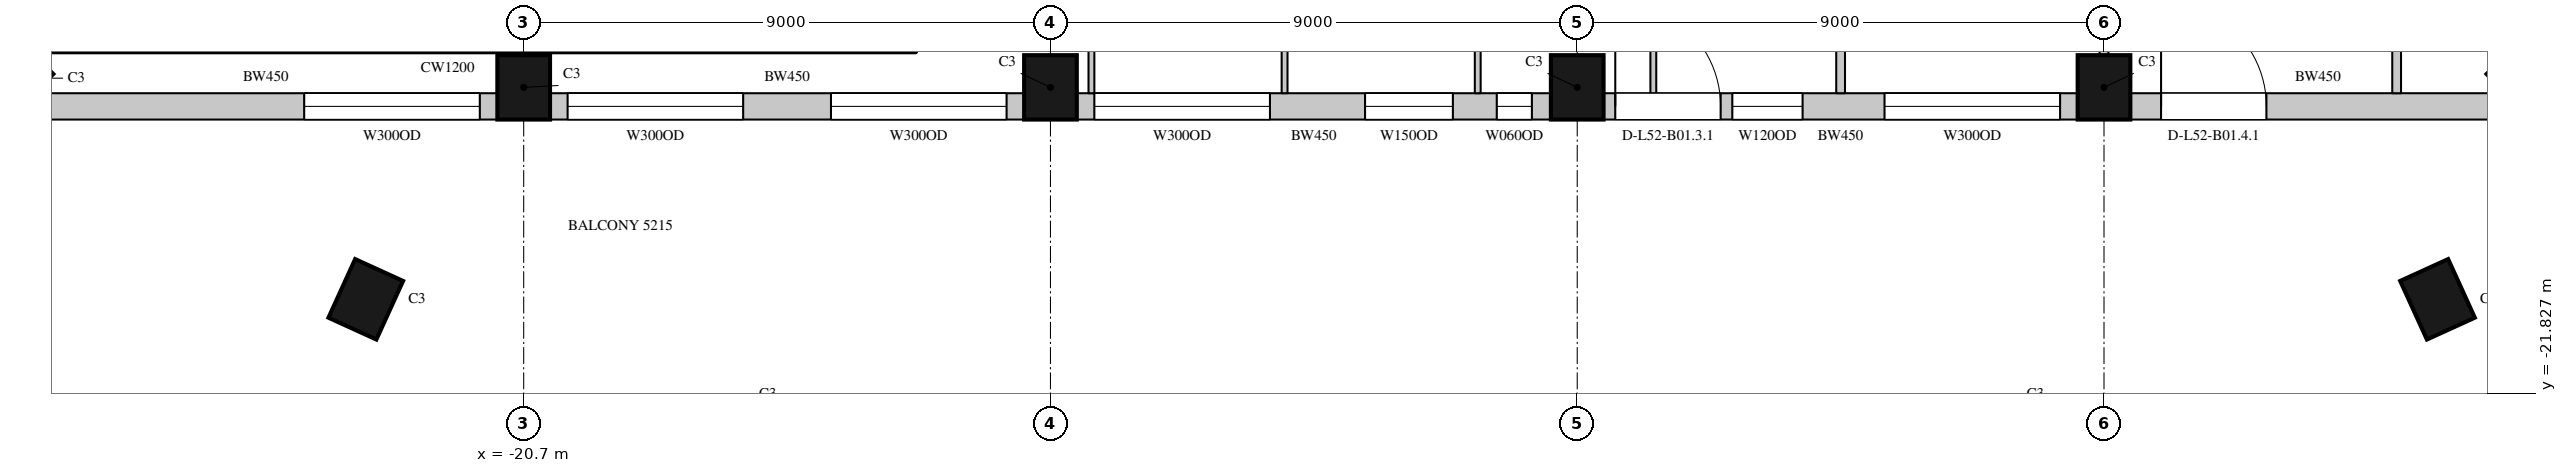
"""IFC4 building model, lengths in metres.
Left out: names, types, materials, properties, quantities, classifications, styles, units other than length and angle.
Written with IfcOpenShell. Run it as: python <this file> out.ifc"""

import sys

from ifc_helpers import new_model, si_unit, direction, frame, frame_2d, origin, origin_2d, place, context, subcontext, project, spatial, rectangle, extrude, element, fill, save


model = new_model("IFC4")
c1 = context("Model", 3, precision=1e-05, world=origin(), true_north=direction((0.0, 1.0)))
c2 = subcontext(c1, "Body", "Model", "MODEL_VIEW")
j1 = project(units=[si_unit("LENGTHUNIT", "METRE"), si_unit("PLANEANGLEUNIT", "RADIAN")], contexts=[c1])
p1 = place(None, origin())
s1 = spatial("IfcSite", under=j1, at=p1, CompositionType="ELEMENT")
p2 = place(p1, origin())
s2 = spatial("IfcBuilding", under=s1, at=p2, CompositionType="ELEMENT")
p3 = place(p2, frame((0.0, 0.0, 234.3)))
s3 = spatial("IfcBuildingStorey", under=s2, at=p3, CompositionType="ELEMENT", Elevation=234.3)
for number, where, z_axis, x_axis in (
    (1, (-29.443, -16.443, 0.0), (0.0, 0.0, 1.0), (0.707, -0.707, 0.0)),
    (2, (-20.7, -16.6, 0.0), (0.0, 0.0, 1.0), (1.0, 0.0, 0.0)),
    (3, (-11.7, -16.6, 0.0), (0.0, 0.0, 1.0), (1.0, 0.0, 0.0)),
    (4, (-2.7, -16.6, 0.0), (0.0, 0.0, 1.0), (1.0, 0.0, 0.0)),
    (5, (6.3, -16.6, 0.0), (0.0, 0.0, 1.0), (1.0, 0.0, 0.0)),
    (6, (13.543, -16.443, 0.0), (0.0, 0.0, 1.0), (0.707, 0.707, 0.0)),
    (7, (-23.398, -20.221, 0.0), (0.0, 0.0, 1.0), (0.91, -0.415, 0.0)),
    (8, (11.998, -20.221, 0.0), (0.0, 0.0, 1.0), (0.91, 0.415, 0.0)),
):
    element("IfcColumn", number, at=place(p3, frame(where, z_axis=z_axis, x_axis=x_axis)), inside=s3, PredefinedType="COLUMN", context=c2, shape_type="SweptSolid", body=[
        extrude(rectangle(XDim=0.9, YDim=1.1, at=origin_2d()), origin(), (0.0, 0.0, 1.0), 4.1),
    ])
p4 = place(p3, frame((-29.064, -16.925, 0.0), z_axis=(0.0, 0.0, 1.0), x_axis=(1.0, 0.0, 0.0)))
e9 = element("IfcWall", 9, at=p4, inside=s3, PredefinedType="SOLIDWALL", context=c2, shape_type="SweptSolid", body=[
    extrude(rectangle(XDim=7.914, YDim=0.45, at=frame_2d((3.957, 0.0))), origin(), (0.0, 0.0, 1.0), 3.8),
])
p5 = place(p4, frame((4.614, 0.0, 1.05)))
e10 = element("IfcOpeningElement", 10, at=p5, cuts=e9, PredefinedType="OPENING", context=c2, shape_type="SweptSolid", body=[
    extrude(rectangle(XDim=3.0, YDim=2.4, at=frame_2d((1.5, 1.2))), frame((0.0, 0.235, 0.0), z_axis=(0.0, -1.0, 0.0), x_axis=(1.0, 0.0, 0.0)), (0.0, 0.0, 1.0), 0.47),
])
p6 = place(p3, frame((-20.25, -16.925, 0.0), z_axis=(0.0, 0.0, 1.0), x_axis=(1.0, 0.0, 0.0)))
e11 = element("IfcWall", 11, at=p6, inside=s3, PredefinedType="SOLIDWALL", context=c2, shape_type="SweptSolid", body=[
    extrude(rectangle(XDim=8.1, YDim=0.45, at=frame_2d((4.05, 0.0))), origin(), (0.0, 0.0, 1.0), 3.8),
])
p7 = place(p6, frame((0.3, 0.0, 1.05)))
e12 = element("IfcOpeningElement", 12, at=p7, cuts=e11, PredefinedType="OPENING", context=c2, shape_type="SweptSolid", body=[
    extrude(rectangle(XDim=3.0, YDim=2.4, at=frame_2d((1.5, 1.2))), frame((0.0, 0.235, 0.0), z_axis=(0.0, -1.0, 0.0), x_axis=(1.0, 0.0, 0.0)), (0.0, 0.0, 1.0), 0.47),
])
p8 = place(p6, frame((4.8, 0.0, 1.05)))
e13 = element("IfcOpeningElement", 13, at=p8, cuts=e11, PredefinedType="OPENING", context=c2, shape_type="SweptSolid", body=[
    extrude(rectangle(XDim=3.0, YDim=2.4, at=frame_2d((1.5, 1.2))), frame((0.0, 0.235, 0.0), z_axis=(0.0, -1.0, 0.0), x_axis=(1.0, 0.0, 0.0)), (0.0, 0.0, 1.0), 0.47),
])
p9 = place(p3, frame((-11.25, -16.925, 0.0), z_axis=(0.0, 0.0, 1.0), x_axis=(1.0, 0.0, 0.0)))
e14 = element("IfcWall", 14, at=p9, inside=s3, PredefinedType="SOLIDWALL", context=c2, shape_type="SweptSolid", body=[
    extrude(rectangle(XDim=8.1, YDim=0.45, at=frame_2d((4.05, 0.0))), origin(), (0.0, 0.0, 1.0), 3.8),
])
p10 = place(p9, frame((0.3, 0.0, 1.05)))
e15 = element("IfcOpeningElement", 15, at=p10, cuts=e14, PredefinedType="OPENING", context=c2, shape_type="SweptSolid", body=[
    extrude(rectangle(XDim=3.0, YDim=2.4, at=frame_2d((1.5, 1.2))), frame((0.0, 0.235, 0.0), z_axis=(0.0, -1.0, 0.0), x_axis=(1.0, 0.0, 0.0)), (0.0, 0.0, 1.0), 0.47),
])
p11 = place(p9, frame((4.925, 0.0, 1.05)))
e16 = element("IfcOpeningElement", 16, at=p11, cuts=e14, PredefinedType="OPENING", context=c2, shape_type="SweptSolid", body=[
    extrude(rectangle(XDim=1.5, YDim=2.4, at=frame_2d((0.75, 1.2))), frame((0.0, 0.235, 0.0), z_axis=(0.0, -1.0, 0.0), x_axis=(1.0, 0.0, 0.0)), (0.0, 0.0, 1.0), 0.47),
])
p12 = place(p9, frame((7.175, 0.0, 1.05)))
e17 = element("IfcOpeningElement", 17, at=p12, cuts=e14, PredefinedType="OPENING", context=c2, shape_type="SweptSolid", body=[
    extrude(rectangle(XDim=0.6, YDim=2.4, at=frame_2d((0.3, 1.2))), frame((0.0, 0.235, 0.0), z_axis=(0.0, -1.0, 0.0), x_axis=(1.0, 0.0, 0.0)), (0.0, 0.0, 1.0), 0.47),
])
p13 = place(p3, frame((-2.25, -16.925, 0.0), z_axis=(0.0, 0.0, 1.0), x_axis=(1.0, 0.0, 0.0)))
e18 = element("IfcWall", 18, at=p13, inside=s3, PredefinedType="SOLIDWALL", context=c2, shape_type="SweptSolid", body=[
    extrude(rectangle(XDim=8.1, YDim=0.45, at=frame_2d((4.05, 0.0))), origin(), (0.0, 0.0, 1.0), 3.8),
])
p14 = place(p13, frame((0.2, 0.0, 0.0)))
e19 = element("IfcOpeningElement", 19, at=p14, cuts=e18, PredefinedType="OPENING", context=c2, shape_type="SweptSolid", body=[
    extrude(rectangle(XDim=1.8, YDim=2.4, at=frame_2d((0.9, 1.2))), frame((0.0, 0.235, 0.0), z_axis=(0.0, -1.0, 0.0), x_axis=(1.0, 0.0, 0.0)), (0.0, 0.0, 1.0), 0.47),
])
p15 = place(p13, frame((2.2, 0.0, 1.05)))
e20 = element("IfcOpeningElement", 20, at=p15, cuts=e18, PredefinedType="OPENING", context=c2, shape_type="SweptSolid", body=[
    extrude(rectangle(XDim=1.2, YDim=2.4, at=frame_2d((0.6, 1.2))), frame((0.0, 0.235, 0.0), z_axis=(0.0, -1.0, 0.0), x_axis=(1.0, 0.0, 0.0)), (0.0, 0.0, 1.0), 0.47),
])
p16 = place(p13, frame((4.8, 0.0, 1.05)))
e21 = element("IfcOpeningElement", 21, at=p16, cuts=e18, PredefinedType="OPENING", context=c2, shape_type="SweptSolid", body=[
    extrude(rectangle(XDim=3.0, YDim=2.4, at=frame_2d((1.5, 1.2))), frame((0.0, 0.235, 0.0), z_axis=(0.0, -1.0, 0.0), x_axis=(1.0, 0.0, 0.0)), (0.0, 0.0, 1.0), 0.47),
])
p17 = place(p3, frame((6.75, -16.925, 0.0), z_axis=(0.0, 0.0, 1.0), x_axis=(1.0, 0.0, 0.0)))
e22 = element("IfcWall", 22, at=p17, inside=s3, PredefinedType="SOLIDWALL", context=c2, shape_type="SweptSolid", body=[
    extrude(rectangle(XDim=6.414, YDim=0.45, at=frame_2d((3.207, 0.0))), origin(), (0.0, 0.0, 1.0), 3.8),
])
p18 = place(p17, frame((0.525, 0.0, 0.0)))
e23 = element("IfcOpeningElement", 23, at=p18, cuts=e22, PredefinedType="OPENING", context=c2, shape_type="SweptSolid", body=[
    extrude(rectangle(XDim=1.8, YDim=2.4, at=frame_2d((0.9, 1.2))), frame((0.0, 0.235, 0.0), z_axis=(0.0, -1.0, 0.0), x_axis=(1.0, 0.0, 0.0)), (0.0, 0.0, 1.0), 0.47),
])
p19 = place(p3, frame((-26.95, -18.0, 0.0), z_axis=(0.0, 0.0, 1.0), x_axis=(1.0, 0.0, 0.0)))
e24 = element("IfcWall", 24, at=p19, inside=s3, PredefinedType="SOLIDWALL", context=c2, shape_type="SweptSolid", body=[
    extrude(rectangle(XDim=2.36, YDim=0.45, at=frame_2d((1.18, 0.0))), origin(), (0.0, 0.0, 1.0), 0.6),
])
for number, where, z_axis, x_axis in (
    (25, (-23.69, -18.0, 0.0), (0.0, 0.0, 1.0), (1.0, 0.0, 0.0)),
    (26, (-19.73, -18.0, 0.0), (0.0, 0.0, 1.0), (1.0, 0.0, 0.0)),
    (27, (-15.77, -18.0, 0.0), (0.0, 0.0, 1.0), (1.0, 0.0, 0.0)),
    (28, (-11.81, -18.0, 0.0), (0.0, 0.0, 1.0), (1.0, 0.0, 0.0)),
    (29, (-7.85, -18.0, 0.0), (0.0, 0.0, 1.0), (1.0, 0.0, 0.0)),
):
    element("IfcWall", number, at=place(p3, frame(where, z_axis=z_axis, x_axis=x_axis)), inside=s3, PredefinedType="SOLIDWALL", context=c2, shape_type="SweptSolid", body=[
        extrude(rectangle(XDim=3.76, YDim=0.45, at=frame_2d((1.88, 0.0))), origin(), (0.0, 0.0, 1.0), 0.6),
    ])
p20 = place(p3, frame((-3.89, -18.0, 0.0), z_axis=(0.0, 0.0, 1.0), x_axis=(1.0, 0.0, 0.0)))
e30 = element("IfcWall", 30, at=p20, inside=s3, PredefinedType="SOLIDWALL", context=c2, shape_type="SweptSolid", body=[
    extrude(rectangle(XDim=1.54, YDim=0.45, at=frame_2d((0.77, 0.0))), origin(), (0.0, 0.0, 1.0), 0.6),
])
p21 = place(p3, frame((0.07, -18.0, 0.0), z_axis=(0.0, 0.0, 1.0), x_axis=(1.0, 0.0, 0.0)))
e31 = element("IfcWall", 31, at=p21, inside=s3, PredefinedType="SOLIDWALL", context=c2, shape_type="SweptSolid", body=[
    extrude(rectangle(XDim=3.76, YDim=0.45, at=frame_2d((1.88, 0.0))), origin(), (0.0, 0.0, 1.0), 0.6),
])
p22 = place(p3, frame((4.03, -18.0, 0.0), z_axis=(0.0, 0.0, 1.0), x_axis=(1.0, 0.0, 0.0)))
e32 = element("IfcWall", 32, at=p22, inside=s3, PredefinedType="SOLIDWALL", context=c2, shape_type="SweptSolid", body=[
    extrude(rectangle(XDim=2.945, YDim=0.45, at=frame_2d((1.473, 0.0))), origin(), (0.0, 0.0, 1.0), 0.6),
])
p23 = place(p3, frame((1.8, -16.7, 0.0), z_axis=(0.0, 0.0, 1.0), x_axis=(0.0, 1.0, 0.0)))
e33 = element("IfcWall", 33, at=p23, inside=s3, PredefinedType="PARTITIONING", context=c2, shape_type="SweptSolid", body=[
    extrude(rectangle(XDim=4.3, YDim=0.15, at=frame_2d((2.15, 0.0))), origin(), (0.0, 0.0, 1.0), 3.8),
])
p24 = place(p3, frame((6.3, -16.05, 0.0), z_axis=(0.0, 0.0, 1.0), x_axis=(0.0, 1.0, 0.0)))
e34 = element("IfcWall", 34, at=p24, inside=s3, PredefinedType="PARTITIONING", context=c2, shape_type="SweptSolid", body=[
    extrude(rectangle(XDim=3.65, YDim=0.15, at=frame_2d((1.825, 0.0))), origin(), (0.0, 0.0, 1.0), 3.25),
])
p25 = place(p3, frame((11.3, -16.7, 0.0), z_axis=(0.0, 0.0, 1.0), x_axis=(0.0, 1.0, 0.0)))
e35 = element("IfcWall", 35, at=p25, inside=s3, PredefinedType="PARTITIONING", context=c2, shape_type="SweptSolid", body=[
    extrude(rectangle(XDim=4.4, YDim=0.15, at=frame_2d((2.2, 0.0))), origin(), (0.0, 0.0, 1.0), 3.8),
])
p26 = place(p3, frame((-11.0, -16.7, 0.0), z_axis=(0.0, 0.0, 1.0), x_axis=(0.0, 1.0, 0.0)))
e36 = element("IfcWall", 36, at=p26, inside=s3, PredefinedType="PARTITIONING", context=c2, shape_type="SweptSolid", body=[
    extrude(rectangle(XDim=1.88, YDim=0.1, at=frame_2d((0.94, 0.0))), origin(), (0.0, 0.0, 1.0), 3.8),
])
for number, where, z_axis, x_axis in (
    (37, (-7.7, -16.7, 0.0), (0.0, 0.0, 1.0), (0.0, 1.0, 0.0)),
    (38, (-4.4, -16.7, 0.0), (0.0, 0.0, 1.0), (0.0, 1.0, 0.0)),
    (39, (-1.4, -16.7, 0.0), (0.0, 0.0, 1.0), (0.0, 1.0, 0.0)),
):
    element("IfcWall", number, at=place(p3, frame(where, z_axis=z_axis, x_axis=x_axis)), inside=s3, PredefinedType="PARTITIONING", context=c2, shape_type="SweptSolid", body=[
        extrude(rectangle(XDim=4.3, YDim=0.1, at=frame_2d((2.15, 0.0))), origin(), (0.0, 0.0, 1.0), 3.8),
    ])
p27 = place(p5, origin())
e40 = element("IfcWindow", 40, at=p27, inside=s3, PartitioningType="SINGLE_PANEL", PredefinedType="WINDOW", context=c2, shape_type="SweptSolid", body=[
    extrude(rectangle(XDim=3.0, YDim=2.4, at=frame_2d((1.5, 1.2))), frame((0.0, 0.135, 0.0), z_axis=(0.0, -1.0, 0.0), x_axis=(1.0, 0.0, 0.0)), (0.0, 0.0, 1.0), 0.06),
])
fill(e10, e40)
p28 = place(p7, origin())
e41 = element("IfcWindow", 41, at=p28, inside=s3, PartitioningType="SINGLE_PANEL", PredefinedType="WINDOW", context=c2, shape_type="SweptSolid", body=[
    extrude(rectangle(XDim=3.0, YDim=2.4, at=frame_2d((1.5, 1.2))), frame((0.0, 0.135, 0.0), z_axis=(0.0, -1.0, 0.0), x_axis=(1.0, 0.0, 0.0)), (0.0, 0.0, 1.0), 0.06),
])
fill(e12, e41)
p29 = place(p8, origin())
e42 = element("IfcWindow", 42, at=p29, inside=s3, PartitioningType="SINGLE_PANEL", PredefinedType="WINDOW", context=c2, shape_type="SweptSolid", body=[
    extrude(rectangle(XDim=3.0, YDim=2.4, at=frame_2d((1.5, 1.2))), frame((0.0, 0.135, 0.0), z_axis=(0.0, -1.0, 0.0), x_axis=(1.0, 0.0, 0.0)), (0.0, 0.0, 1.0), 0.06),
])
fill(e13, e42)
p30 = place(p10, origin())
e43 = element("IfcWindow", 43, at=p30, inside=s3, PartitioningType="SINGLE_PANEL", PredefinedType="WINDOW", context=c2, shape_type="SweptSolid", body=[
    extrude(rectangle(XDim=3.0, YDim=2.4, at=frame_2d((1.5, 1.2))), frame((0.0, 0.135, 0.0), z_axis=(0.0, -1.0, 0.0), x_axis=(1.0, 0.0, 0.0)), (0.0, 0.0, 1.0), 0.06),
])
fill(e15, e43)
p31 = place(p14, origin())
e44 = element("IfcDoor", 44, at=p31, inside=s3, OperationType="SLIDING_TO_LEFT", PredefinedType="DOOR", context=c2, shape_type="SweptSolid", body=[
    extrude(rectangle(XDim=1.8, YDim=2.4, at=frame_2d((0.9, 1.2))), frame((0.0, 0.13, 0.0), z_axis=(0.0, -1.0, 0.0), x_axis=(1.0, 0.0, 0.0)), (0.0, 0.0, 1.0), 0.05),
])
fill(e19, e44)
p32 = place(p15, origin())
e45 = element("IfcWindow", 45, at=p32, inside=s3, PartitioningType="SINGLE_PANEL", PredefinedType="WINDOW", context=c2, shape_type="SweptSolid", body=[
    extrude(rectangle(XDim=1.2, YDim=2.4, at=frame_2d((0.6, 1.2))), frame((0.0, 0.135, 0.0), z_axis=(0.0, -1.0, 0.0), x_axis=(1.0, 0.0, 0.0)), (0.0, 0.0, 1.0), 0.06),
])
fill(e20, e45)
p33 = place(p16, origin())
e46 = element("IfcWindow", 46, at=p33, inside=s3, PartitioningType="SINGLE_PANEL", PredefinedType="WINDOW", context=c2, shape_type="SweptSolid", body=[
    extrude(rectangle(XDim=3.0, YDim=2.4, at=frame_2d((1.5, 1.2))), frame((0.0, 0.135, 0.0), z_axis=(0.0, -1.0, 0.0), x_axis=(1.0, 0.0, 0.0)), (0.0, 0.0, 1.0), 0.06),
])
fill(e21, e46)
p34 = place(p18, origin())
e47 = element("IfcDoor", 47, at=p34, inside=s3, OperationType="SLIDING_TO_LEFT", PredefinedType="DOOR", context=c2, shape_type="SweptSolid", body=[
    extrude(rectangle(XDim=1.8, YDim=2.4, at=frame_2d((0.9, 1.2))), frame((0.0, 0.13, 0.0), z_axis=(0.0, -1.0, 0.0), x_axis=(1.0, 0.0, 0.0)), (0.0, 0.0, 1.0), 0.05),
])
fill(e23, e47)
p35 = place(p11, origin())
e48 = element("IfcWindow", 48, at=p35, inside=s3, PartitioningType="SINGLE_PANEL", PredefinedType="WINDOW", context=c2, shape_type="SweptSolid", body=[
    extrude(rectangle(XDim=1.5, YDim=2.4, at=frame_2d((0.75, 1.2))), frame((0.0, 0.135, 0.0), z_axis=(0.0, -1.0, 0.0), x_axis=(1.0, 0.0, 0.0)), (0.0, 0.0, 1.0), 0.06),
])
fill(e16, e48)
p36 = place(p12, origin())
e49 = element("IfcWindow", 49, at=p36, inside=s3, PartitioningType="SINGLE_PANEL", PredefinedType="WINDOW", context=c2, shape_type="SweptSolid", body=[
    extrude(rectangle(XDim=0.6, YDim=2.4, at=frame_2d((0.3, 1.2))), frame((0.0, 0.135, 0.0), z_axis=(0.0, -1.0, 0.0), x_axis=(1.0, 0.0, 0.0)), (0.0, 0.0, 1.0), 0.06),
])
fill(e17, e49)
save(model, sys.argv[1])
